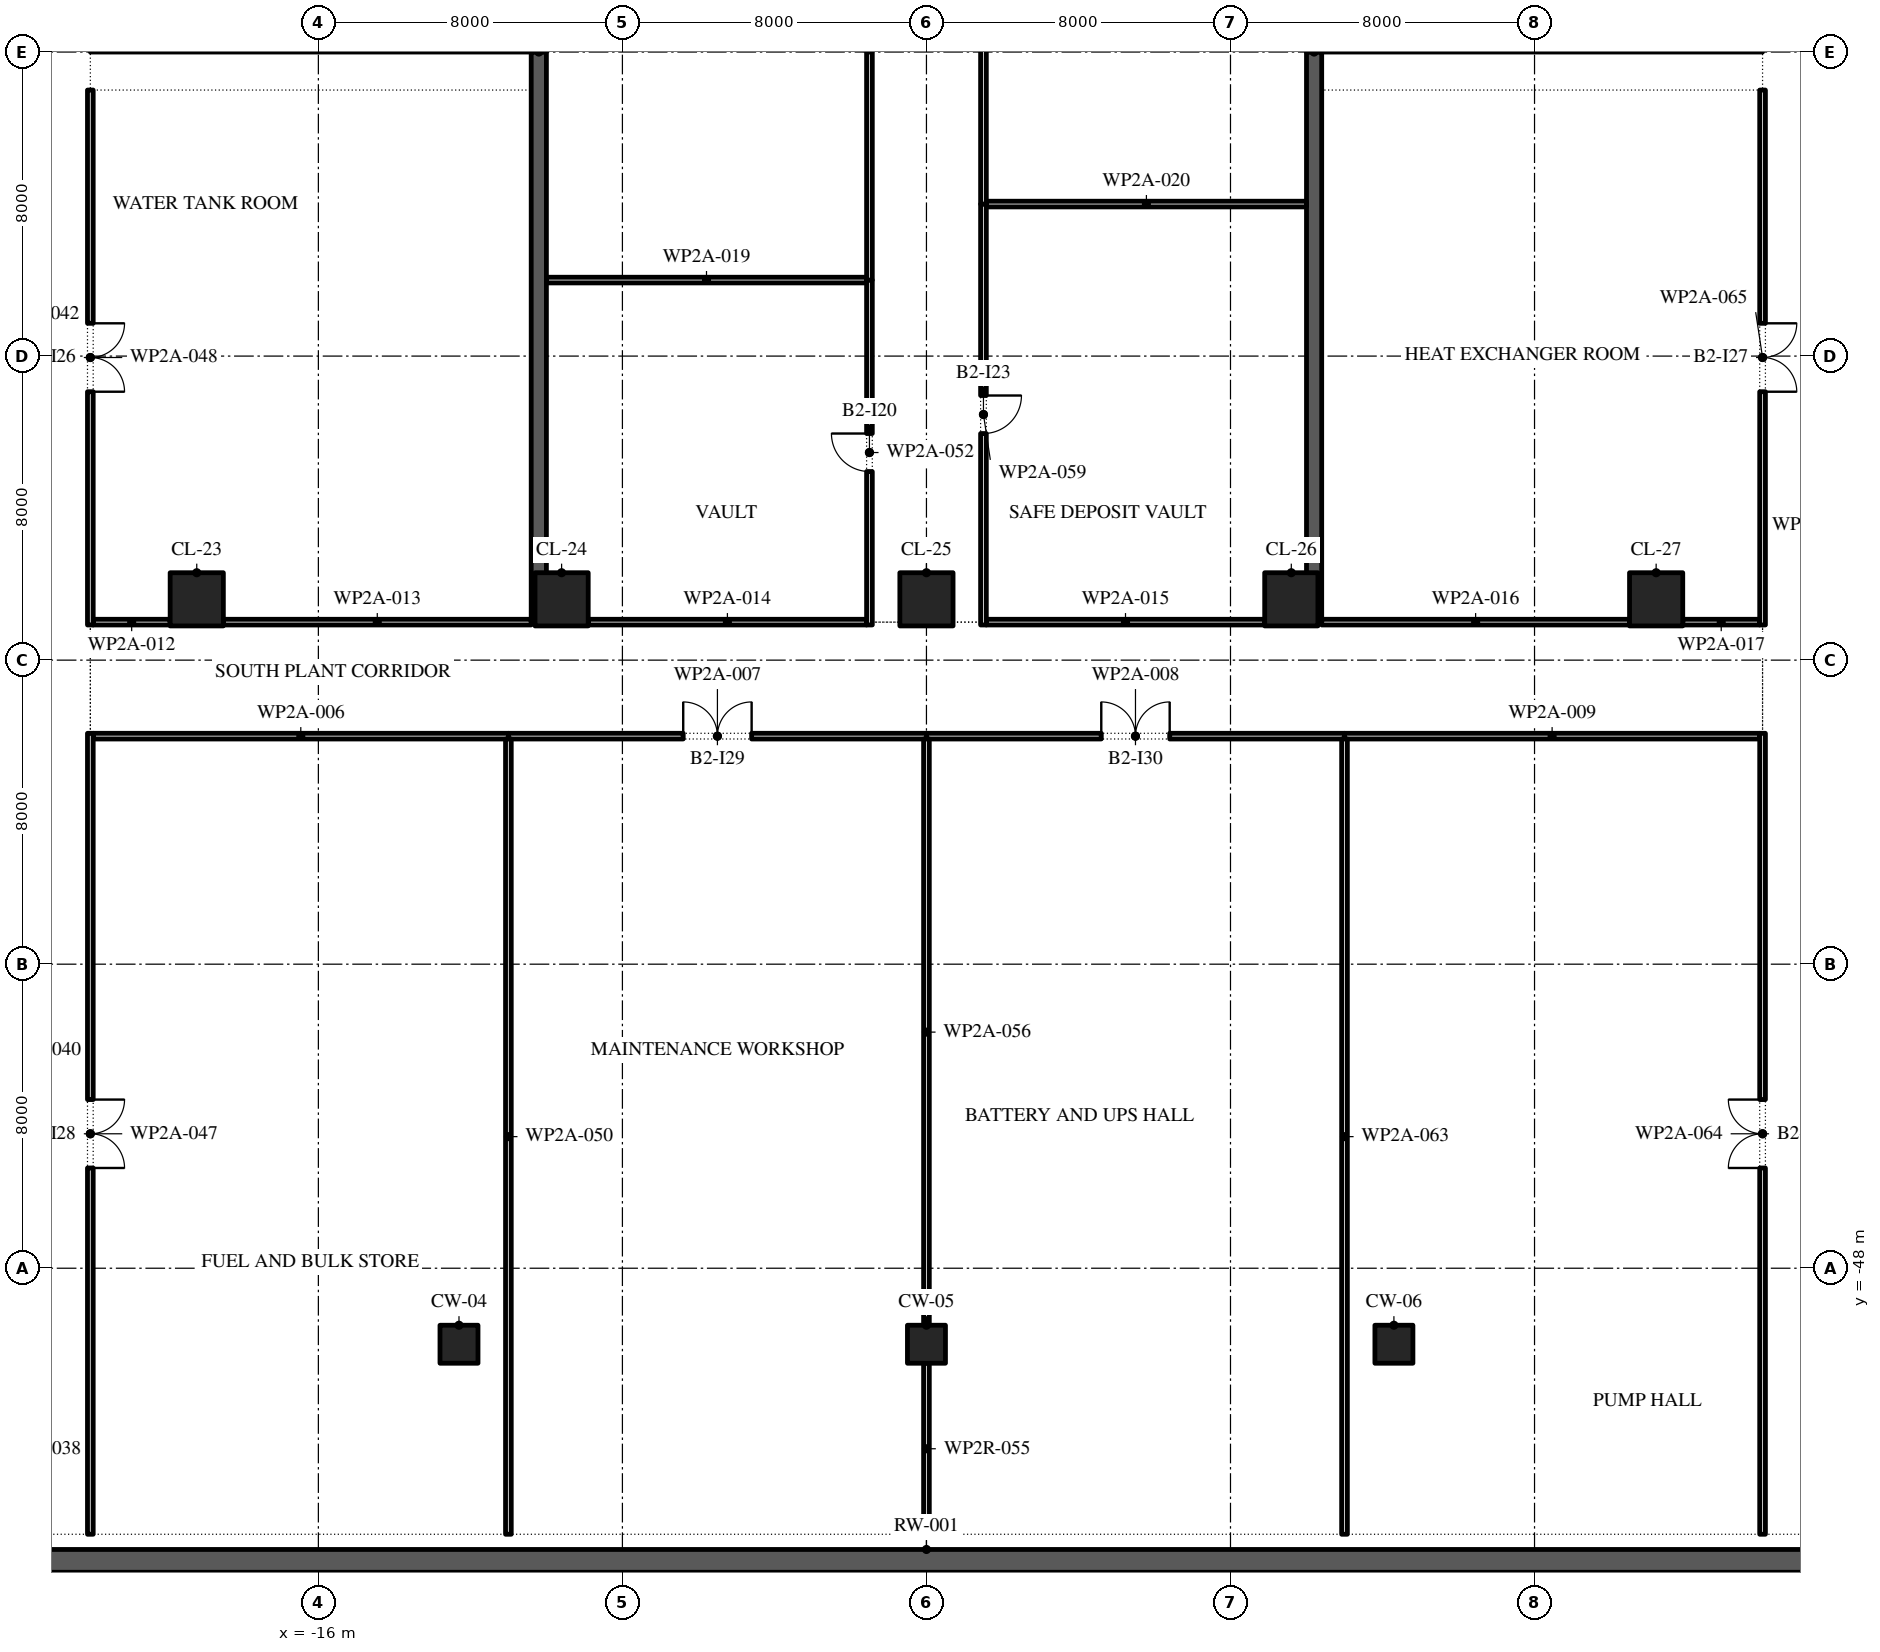
"""IFC4 building model, lengths in metres.
Left out: names, types, materials, properties, quantities, classifications, styles, units other than length and angle.
Written with IfcOpenShell. Run it as: python <this file> out.ifc"""

import sys

from ifc_helpers import new_model, si_unit, direction, frame, frame_2d, origin, origin_2d, place, context, subcontext, project, spatial, rectangle, extrude, element, fill, save


model = new_model("IFC4")
c1 = context("Model", 3, precision=1e-05, world=origin(), true_north=direction((0.0, 1.0)))
c2 = subcontext(c1, "Body", "Model", "MODEL_VIEW")
j1 = project(units=[si_unit("LENGTHUNIT", "METRE"), si_unit("PLANEANGLEUNIT", "RADIAN")], contexts=[c1])
p1 = place(None, origin())
s1 = spatial("IfcSite", under=j1, at=p1, CompositionType="ELEMENT")
p2 = place(p1, origin())
s2 = spatial("IfcBuilding", under=s1, at=p2, CompositionType="ELEMENT")
p3 = place(p2, frame((0.0, 0.0, -10.4)))
s3 = spatial("IfcBuildingStorey", under=s2, at=p3, CompositionType="ELEMENT", Elevation=-10.4)
p4 = place(p3, frame((-48.0, -55.7, -0.3), z_axis=(0.0, 0.0, 1.0), x_axis=(1.0, 0.0, 0.0)))
e1 = element("IfcWall", 1, at=p4, inside=s3, PredefinedType="SOLIDWALL", context=c2, shape_type="SweptSolid", body=[
    extrude(rectangle(XDim=96.0, YDim=0.6, at=frame_2d((48.0, 0.0))), origin(), (0.0, 0.0, 1.0), 5.5),
])
for number, where, z_axis, x_axis in (
    (2, (-12.3, -50.0, -0.3), (0.0, 0.0, 1.0), (1.0, 0.0, 0.0)),
    (3, (0.0, -50.0, -0.3), (0.0, 0.0, 1.0), (1.0, 0.0, 0.0)),
    (4, (12.3, -50.0, -0.3), (0.0, 0.0, 1.0), (1.0, 0.0, 0.0)),
):
    element("IfcColumn", number, at=place(p3, frame(where, z_axis=z_axis, x_axis=x_axis)), inside=s3, PredefinedType="COLUMN", context=c2, shape_type="SweptSolid", body=[
        extrude(rectangle(XDim=1.0, YDim=1.0, at=origin_2d()), origin(), (0.0, 0.0, 1.0), 5.5),
    ])
for number, where, z_axis, x_axis in (
    (5, (-19.2, -30.4, -0.3), (0.0, 0.0, 1.0), (1.0, 0.0, 0.0)),
    (6, (-9.6, -30.4, -0.3), (0.0, 0.0, 1.0), (1.0, 0.0, 0.0)),
    (7, (0.0, -30.4, -0.3), (0.0, 0.0, 1.0), (1.0, 0.0, 0.0)),
    (8, (9.6, -30.4, -0.3), (0.0, 0.0, 1.0), (1.0, 0.0, 0.0)),
    (9, (19.2, -30.4, -0.3), (0.0, 0.0, 1.0), (1.0, 0.0, 0.0)),
):
    element("IfcColumn", number, at=place(p3, frame(where, z_axis=z_axis, x_axis=x_axis)), inside=s3, PredefinedType="COLUMN", context=c2, shape_type="SweptSolid", body=[
        extrude(rectangle(XDim=1.4, YDim=1.4, at=origin_2d()), origin(), (0.0, 0.0, 1.0), 5.5),
    ])
for number, where, z_axis, x_axis in (
    (10, (-10.2, -31.0, -0.3), (0.0, 0.0, 1.0), (0.0, 1.0, 0.0)),
    (11, (10.2, -31.0, -0.3), (0.0, 0.0, 1.0), (0.0, 1.0, 0.0)),
):
    element("IfcWall", number, at=place(p3, frame(where, z_axis=z_axis, x_axis=x_axis)), inside=s3, PredefinedType="SHEAR", context=c2, shape_type="SweptSolid", body=[
        extrude(rectangle(XDim=15.0, YDim=0.4, at=frame_2d((7.5, 0.0))), origin(), (0.0, 0.0, 1.0), 5.2),
    ])
p5 = place(p3, frame((-21.925, -34.0, 0.0), z_axis=(0.0, 0.0, 1.0), x_axis=(1.0, 0.0, 0.0)))
e12 = element("IfcWall", 12, at=p5, inside=s3, PredefinedType="PARTITIONING", context=c2, shape_type="SweptSolid", body=[
    extrude(rectangle(XDim=10.925, YDim=0.15, at=frame_2d((5.462, 0.0))), origin(), (0.0, 0.0, 1.0), 4.9),
])
p6 = place(p3, frame((-11.0, -34.0, 0.0), z_axis=(0.0, 0.0, 1.0), x_axis=(1.0, 0.0, 0.0)))
e13 = element("IfcWall", 13, at=p6, inside=s3, PredefinedType="PARTITIONING", context=c2, shape_type="SweptSolid", body=[
    extrude(rectangle(XDim=11.0, YDim=0.15, at=frame_2d((5.5, 0.0))), origin(), (0.0, 0.0, 1.0), 4.9),
])
p7 = place(p6, frame((4.6, 0.0, 0.0)))
e14 = element("IfcOpeningElement", 14, at=p7, cuts=e13, PredefinedType="OPENING", context=c2, shape_type="SweptSolid", body=[
    extrude(rectangle(XDim=1.8, YDim=2.1, at=frame_2d((0.9, 1.05))), frame((0.0, 0.085, 0.0), z_axis=(0.0, -1.0, 0.0), x_axis=(1.0, 0.0, 0.0)), (0.0, 0.0, 1.0), 0.17),
])
p8 = place(p3, frame((0.0, -34.0, 0.0), z_axis=(0.0, 0.0, 1.0), x_axis=(1.0, 0.0, 0.0)))
e15 = element("IfcWall", 15, at=p8, inside=s3, PredefinedType="PARTITIONING", context=c2, shape_type="SweptSolid", body=[
    extrude(rectangle(XDim=11.0, YDim=0.15, at=frame_2d((5.5, 0.0))), origin(), (0.0, 0.0, 1.0), 4.9),
])
p9 = place(p8, frame((4.6, 0.0, 0.0)))
e16 = element("IfcOpeningElement", 16, at=p9, cuts=e15, PredefinedType="OPENING", context=c2, shape_type="SweptSolid", body=[
    extrude(rectangle(XDim=1.8, YDim=2.1, at=frame_2d((0.9, 1.05))), frame((0.0, 0.085, 0.0), z_axis=(0.0, -1.0, 0.0), x_axis=(1.0, 0.0, 0.0)), (0.0, 0.0, 1.0), 0.17),
])
p10 = place(p3, frame((11.0, -34.0, 0.0), z_axis=(0.0, 0.0, 1.0), x_axis=(1.0, 0.0, 0.0)))
e17 = element("IfcWall", 17, at=p10, inside=s3, PredefinedType="PARTITIONING", context=c2, shape_type="SweptSolid", body=[
    extrude(rectangle(XDim=10.925, YDim=0.15, at=frame_2d((5.462, 0.0))), origin(), (0.0, 0.0, 1.0), 4.9),
])
p11 = place(p3, frame((-21.925, -31.0, 0.0), z_axis=(0.0, 0.0, 1.0), x_axis=(1.0, 0.0, 0.0)))
e18 = element("IfcWall", 18, at=p11, inside=s3, PredefinedType="PARTITIONING", context=c2, shape_type="SweptSolid", body=[
    extrude(rectangle(XDim=2.025, YDim=0.15, at=frame_2d((1.013, 0.0))), origin(), (0.0, 0.0, 1.0), 4.9),
])
p12 = place(p3, frame((-18.5, -31.0, 0.0), z_axis=(0.0, 0.0, 1.0), x_axis=(1.0, 0.0, 0.0)))
e19 = element("IfcWall", 19, at=p12, inside=s3, PredefinedType="PARTITIONING", context=c2, shape_type="SweptSolid", body=[
    extrude(rectangle(XDim=8.1, YDim=0.15, at=frame_2d((4.05, 0.0))), origin(), (0.0, 0.0, 1.0), 4.9),
])
for number, where, z_axis, x_axis in (
    (20, (-8.9, -31.0, 0.0), (0.0, 0.0, 1.0), (1.0, 0.0, 0.0)),
    (21, (1.575, -31.0, 0.0), (0.0, 0.0, 1.0), (1.0, 0.0, 0.0)),
):
    element("IfcWall", number, at=place(p3, frame(where, z_axis=z_axis, x_axis=x_axis)), inside=s3, PredefinedType="PARTITIONING", context=c2, shape_type="SweptSolid", body=[
        extrude(rectangle(XDim=7.325, YDim=0.15, at=frame_2d((3.663, 0.0))), origin(), (0.0, 0.0, 1.0), 4.9),
    ])
p13 = place(p3, frame((10.4, -31.0, 0.0), z_axis=(0.0, 0.0, 1.0), x_axis=(1.0, 0.0, 0.0)))
e22 = element("IfcWall", 22, at=p13, inside=s3, PredefinedType="PARTITIONING", context=c2, shape_type="SweptSolid", body=[
    extrude(rectangle(XDim=8.1, YDim=0.15, at=frame_2d((4.05, 0.0))), origin(), (0.0, 0.0, 1.0), 4.9),
])
p14 = place(p3, frame((19.9, -31.0, 0.0), z_axis=(0.0, 0.0, 1.0), x_axis=(1.0, 0.0, 0.0)))
e23 = element("IfcWall", 23, at=p14, inside=s3, PredefinedType="PARTITIONING", context=c2, shape_type="SweptSolid", body=[
    extrude(rectangle(XDim=2.025, YDim=0.15, at=frame_2d((1.013, 0.0))), origin(), (0.0, 0.0, 1.0), 4.9),
])
for number, where, z_axis, x_axis in (
    (24, (-10.0, -22.0, 0.0), (0.0, 0.0, 1.0), (1.0, 0.0, 0.0)),
    (25, (1.575, -20.0, 0.0), (0.0, 0.0, 1.0), (1.0, 0.0, 0.0)),
):
    element("IfcWall", number, at=place(p3, frame(where, z_axis=z_axis, x_axis=x_axis)), inside=s3, PredefinedType="PARTITIONING", context=c2, shape_type="SweptSolid", body=[
        extrude(rectangle(XDim=8.425, YDim=0.15, at=frame_2d((4.212, 0.0))), origin(), (0.0, 0.0, 1.0), 4.9),
    ])
p15 = place(p3, frame((-22.0, -55.0, 0.0), z_axis=(0.0, 0.0, 1.0), x_axis=(0.0, 1.0, 0.0)))
e26 = element("IfcWall", 26, at=p15, inside=s3, PredefinedType="PARTITIONING", context=c2, shape_type="SweptSolid", body=[
    extrude(rectangle(XDim=21.075, YDim=0.15, at=frame_2d((10.538, 0.0))), origin(), (0.0, 0.0, 1.0), 4.9),
])
p16 = place(p15, frame((9.637, 0.0, 0.0)))
e27 = element("IfcOpeningElement", 27, at=p16, cuts=e26, PredefinedType="OPENING", context=c2, shape_type="SweptSolid", body=[
    extrude(rectangle(XDim=1.8, YDim=2.1, at=frame_2d((0.9, 1.05))), frame((0.0, 0.085, 0.0), z_axis=(0.0, -1.0, 0.0), x_axis=(1.0, 0.0, 0.0)), (0.0, 0.0, 1.0), 0.17),
])
p17 = place(p3, frame((-22.0, -31.075, 0.0), z_axis=(0.0, 0.0, 1.0), x_axis=(0.0, 1.0, 0.0)))
e28 = element("IfcWall", 28, at=p17, inside=s3, PredefinedType="PARTITIONING", context=c2, shape_type="SweptSolid", body=[
    extrude(rectangle(XDim=14.075, YDim=0.15, at=frame_2d((7.038, 0.0))), origin(), (0.0, 0.0, 1.0), 4.9),
])
p18 = place(p17, frame((6.137, 0.0, 0.0)))
e29 = element("IfcOpeningElement", 29, at=p18, cuts=e28, PredefinedType="OPENING", context=c2, shape_type="SweptSolid", body=[
    extrude(rectangle(XDim=1.8, YDim=2.1, at=frame_2d((0.9, 1.05))), frame((0.0, 0.085, 0.0), z_axis=(0.0, -1.0, 0.0), x_axis=(1.0, 0.0, 0.0)), (0.0, 0.0, 1.0), 0.17),
])
p19 = place(p3, frame((-11.0, -55.0, 0.0), z_axis=(0.0, 0.0, 1.0), x_axis=(0.0, 1.0, 0.0)))
e30 = element("IfcWall", 30, at=p19, inside=s3, PredefinedType="PARTITIONING", context=c2, shape_type="SweptSolid", body=[
    extrude(rectangle(XDim=20.925, YDim=0.15, at=frame_2d((10.462, 0.0))), origin(), (0.0, 0.0, 1.0), 4.9),
])
p20 = place(p3, frame((-1.5, -31.075, 0.0), z_axis=(0.0, 0.0, 1.0), x_axis=(0.0, 1.0, 0.0)))
e31 = element("IfcWall", 31, at=p20, inside=s3, PredefinedType="PARTITIONING", context=c2, shape_type="SweptSolid", body=[
    extrude(rectangle(XDim=9.075, YDim=0.15, at=frame_2d((4.538, 0.0))), origin(), (0.0, 0.0, 1.0), 4.9),
])
p21 = place(p20, frame((4.038, 0.0, 0.0)))
e32 = element("IfcOpeningElement", 32, at=p21, cuts=e31, PredefinedType="OPENING", context=c2, shape_type="SweptSolid", body=[
    extrude(rectangle(XDim=1.0, YDim=2.1, at=frame_2d((0.5, 1.05))), frame((0.0, 0.085, 0.0), z_axis=(0.0, -1.0, 0.0), x_axis=(1.0, 0.0, 0.0)), (0.0, 0.0, 1.0), 0.17),
])
p22 = place(p3, frame((-1.5, -22.0, 0.0), z_axis=(0.0, 0.0, 1.0), x_axis=(0.0, 1.0, 0.0)))
e33 = element("IfcWall", 33, at=p22, inside=s3, PredefinedType="PARTITIONING", context=c2, shape_type="SweptSolid", body=[
    extrude(rectangle(XDim=13.0, YDim=0.15, at=frame_2d((6.5, 0.0))), origin(), (0.0, 0.0, 1.0), 4.9),
])
p23 = place(p22, frame((6.0, 0.0, 0.0)))
e34 = element("IfcOpeningElement", 34, at=p23, cuts=e33, PredefinedType="OPENING", context=c2, shape_type="SweptSolid", body=[
    extrude(rectangle(XDim=1.0, YDim=2.1, at=frame_2d((0.5, 1.05))), frame((0.0, 0.085, 0.0), z_axis=(0.0, -1.0, 0.0), x_axis=(1.0, 0.0, 0.0)), (0.0, 0.0, 1.0), 0.17),
])
p24 = place(p3, frame((0.0, -55.0, 0.0), z_axis=(0.0, 0.0, 1.0), x_axis=(0.0, 1.0, 0.0)))
e35 = element("IfcWall", 35, at=p24, inside=s3, PredefinedType="PARTITIONING", context=c2, shape_type="SweptSolid", body=[
    extrude(rectangle(XDim=4.5, YDim=0.15, at=frame_2d((2.25, 0.0))), origin(), (0.0, 0.0, 1.0), 4.59),
])
p25 = place(p3, frame((0.0, -49.5, 0.0), z_axis=(0.0, 0.0, 1.0), x_axis=(0.0, 1.0, 0.0)))
e36 = element("IfcWall", 36, at=p25, inside=s3, PredefinedType="PARTITIONING", context=c2, shape_type="SweptSolid", body=[
    extrude(rectangle(XDim=15.425, YDim=0.15, at=frame_2d((7.712, 0.0))), origin(), (0.0, 0.0, 1.0), 4.9),
])
p26 = place(p3, frame((1.5, -31.075, 0.0), z_axis=(0.0, 0.0, 1.0), x_axis=(0.0, 1.0, 0.0)))
e37 = element("IfcWall", 37, at=p26, inside=s3, PredefinedType="PARTITIONING", context=c2, shape_type="SweptSolid", body=[
    extrude(rectangle(XDim=11.075, YDim=0.15, at=frame_2d((5.538, 0.0))), origin(), (0.0, 0.0, 1.0), 4.9),
])
p27 = place(p26, frame((5.038, 0.0, 0.0)))
e38 = element("IfcOpeningElement", 38, at=p27, cuts=e37, PredefinedType="OPENING", context=c2, shape_type="SweptSolid", body=[
    extrude(rectangle(XDim=1.0, YDim=2.1, at=frame_2d((0.5, 1.05))), frame((0.0, 0.085, 0.0), z_axis=(0.0, -1.0, 0.0), x_axis=(1.0, 0.0, 0.0)), (0.0, 0.0, 1.0), 0.17),
])
p28 = place(p3, frame((1.5, -20.0, 0.0), z_axis=(0.0, 0.0, 1.0), x_axis=(0.0, 1.0, 0.0)))
e39 = element("IfcWall", 39, at=p28, inside=s3, PredefinedType="PARTITIONING", context=c2, shape_type="SweptSolid", body=[
    extrude(rectangle(XDim=13.0, YDim=0.15, at=frame_2d((6.5, 0.0))), origin(), (0.0, 0.0, 1.0), 4.9),
])
p29 = place(p28, frame((6.0, 0.0, 0.0)))
e40 = element("IfcOpeningElement", 40, at=p29, cuts=e39, PredefinedType="OPENING", context=c2, shape_type="SweptSolid", body=[
    extrude(rectangle(XDim=1.0, YDim=2.1, at=frame_2d((0.5, 1.05))), frame((0.0, 0.085, 0.0), z_axis=(0.0, -1.0, 0.0), x_axis=(1.0, 0.0, 0.0)), (0.0, 0.0, 1.0), 0.17),
])
p30 = place(p3, frame((11.0, -55.0, 0.0), z_axis=(0.0, 0.0, 1.0), x_axis=(0.0, 1.0, 0.0)))
e41 = element("IfcWall", 41, at=p30, inside=s3, PredefinedType="PARTITIONING", context=c2, shape_type="SweptSolid", body=[
    extrude(rectangle(XDim=20.925, YDim=0.15, at=frame_2d((10.462, 0.0))), origin(), (0.0, 0.0, 1.0), 4.9),
])
p31 = place(p3, frame((22.0, -55.0, 0.0), z_axis=(0.0, 0.0, 1.0), x_axis=(0.0, 1.0, 0.0)))
e42 = element("IfcWall", 42, at=p31, inside=s3, PredefinedType="PARTITIONING", context=c2, shape_type="SweptSolid", body=[
    extrude(rectangle(XDim=21.075, YDim=0.15, at=frame_2d((10.538, 0.0))), origin(), (0.0, 0.0, 1.0), 4.9),
])
p32 = place(p31, frame((9.637, 0.0, 0.0)))
e43 = element("IfcOpeningElement", 43, at=p32, cuts=e42, PredefinedType="OPENING", context=c2, shape_type="SweptSolid", body=[
    extrude(rectangle(XDim=1.8, YDim=2.1, at=frame_2d((0.9, 1.05))), frame((0.0, 0.085, 0.0), z_axis=(0.0, -1.0, 0.0), x_axis=(1.0, 0.0, 0.0)), (0.0, 0.0, 1.0), 0.17),
])
p33 = place(p3, frame((22.0, -31.075, 0.0), z_axis=(0.0, 0.0, 1.0), x_axis=(0.0, 1.0, 0.0)))
e44 = element("IfcWall", 44, at=p33, inside=s3, PredefinedType="PARTITIONING", context=c2, shape_type="SweptSolid", body=[
    extrude(rectangle(XDim=14.075, YDim=0.15, at=frame_2d((7.038, 0.0))), origin(), (0.0, 0.0, 1.0), 4.9),
])
p34 = place(p33, frame((6.137, 0.0, 0.0)))
e45 = element("IfcOpeningElement", 45, at=p34, cuts=e44, PredefinedType="OPENING", context=c2, shape_type="SweptSolid", body=[
    extrude(rectangle(XDim=1.8, YDim=2.1, at=frame_2d((0.9, 1.05))), frame((0.0, 0.085, 0.0), z_axis=(0.0, -1.0, 0.0), x_axis=(1.0, 0.0, 0.0)), (0.0, 0.0, 1.0), 0.17),
])
p35 = place(p21, origin())
e46 = element("IfcDoor", 46, at=p35, inside=s3, OperationType="SINGLE_SWING_LEFT", PredefinedType="DOOR", context=c2, shape_type="SweptSolid", body=[
    extrude(rectangle(XDim=1.0, YDim=2.1, at=frame_2d((0.5, 1.05))), frame((0.0, 0.025, 0.0), z_axis=(0.0, -1.0, 0.0), x_axis=(1.0, 0.0, 0.0)), (0.0, 0.0, 1.0), 0.05),
])
fill(e32, e46)
p36 = place(p27, frame((1.0, 0.0, 0.0), z_axis=(0.0, 0.0, 1.0), x_axis=(-1.0, 0.0, 0.0)))
e47 = element("IfcDoor", 47, at=p36, inside=s3, OperationType="SINGLE_SWING_RIGHT", PredefinedType="DOOR", context=c2, shape_type="SweptSolid", body=[
    extrude(rectangle(XDim=1.0, YDim=2.1, at=frame_2d((0.5, 1.05))), frame((0.0, 0.025, 0.0), z_axis=(0.0, -1.0, 0.0), x_axis=(1.0, 0.0, 0.0)), (0.0, 0.0, 1.0), 0.05),
])
fill(e38, e47)
p37 = place(p18, frame((1.8, 0.0, 0.0), z_axis=(0.0, 0.0, 1.0), x_axis=(-1.0, 0.0, 0.0)))
e48 = element("IfcDoor", 48, at=p37, inside=s3, OperationType="SINGLE_SWING_LEFT", PredefinedType="DOOR", context=c2, shape_type="SweptSolid", body=[
    extrude(rectangle(XDim=1.8, YDim=2.1, at=frame_2d((0.9, 1.05))), frame((0.0, 0.025, 0.0), z_axis=(0.0, -1.0, 0.0), x_axis=(1.0, 0.0, 0.0)), (0.0, 0.0, 1.0), 0.05),
])
fill(e29, e48)
p38 = place(p34, frame((1.8, 0.0, 0.0), z_axis=(0.0, 0.0, 1.0), x_axis=(-1.0, 0.0, 0.0)))
e49 = element("IfcDoor", 49, at=p38, inside=s3, OperationType="SINGLE_SWING_LEFT", PredefinedType="DOOR", context=c2, shape_type="SweptSolid", body=[
    extrude(rectangle(XDim=1.8, YDim=2.1, at=frame_2d((0.9, 1.05))), frame((0.0, 0.025, 0.0), z_axis=(0.0, -1.0, 0.0), x_axis=(1.0, 0.0, 0.0)), (0.0, 0.0, 1.0), 0.05),
])
fill(e45, e49)
p39 = place(p16, frame((1.8, 0.0, 0.0), z_axis=(0.0, 0.0, 1.0), x_axis=(-1.0, 0.0, 0.0)))
e50 = element("IfcDoor", 50, at=p39, inside=s3, OperationType="SINGLE_SWING_RIGHT", PredefinedType="DOOR", context=c2, shape_type="SweptSolid", body=[
    extrude(rectangle(XDim=1.8, YDim=2.1, at=frame_2d((0.9, 1.05))), frame((0.0, 0.025, 0.0), z_axis=(0.0, -1.0, 0.0), x_axis=(1.0, 0.0, 0.0)), (0.0, 0.0, 1.0), 0.05),
])
fill(e27, e50)
p40 = place(p7, origin())
e51 = element("IfcDoor", 51, at=p40, inside=s3, OperationType="SINGLE_SWING_LEFT", PredefinedType="DOOR", context=c2, shape_type="SweptSolid", body=[
    extrude(rectangle(XDim=1.8, YDim=2.1, at=frame_2d((0.9, 1.05))), frame((0.0, 0.025, 0.0), z_axis=(0.0, -1.0, 0.0), x_axis=(1.0, 0.0, 0.0)), (0.0, 0.0, 1.0), 0.05),
])
fill(e14, e51)
p41 = place(p9, origin())
e52 = element("IfcDoor", 52, at=p41, inside=s3, OperationType="SINGLE_SWING_RIGHT", PredefinedType="DOOR", context=c2, shape_type="SweptSolid", body=[
    extrude(rectangle(XDim=1.8, YDim=2.1, at=frame_2d((0.9, 1.05))), frame((0.0, 0.025, 0.0), z_axis=(0.0, -1.0, 0.0), x_axis=(1.0, 0.0, 0.0)), (0.0, 0.0, 1.0), 0.05),
])
fill(e16, e52)
p42 = place(p32, origin())
e53 = element("IfcDoor", 53, at=p42, inside=s3, OperationType="SINGLE_SWING_RIGHT", PredefinedType="DOOR", context=c2, shape_type="SweptSolid", body=[
    extrude(rectangle(XDim=1.8, YDim=2.1, at=frame_2d((0.9, 1.05))), frame((0.0, 0.025, 0.0), z_axis=(0.0, -1.0, 0.0), x_axis=(1.0, 0.0, 0.0)), (0.0, 0.0, 1.0), 0.05),
])
fill(e43, e53)
save(model, sys.argv[1])
